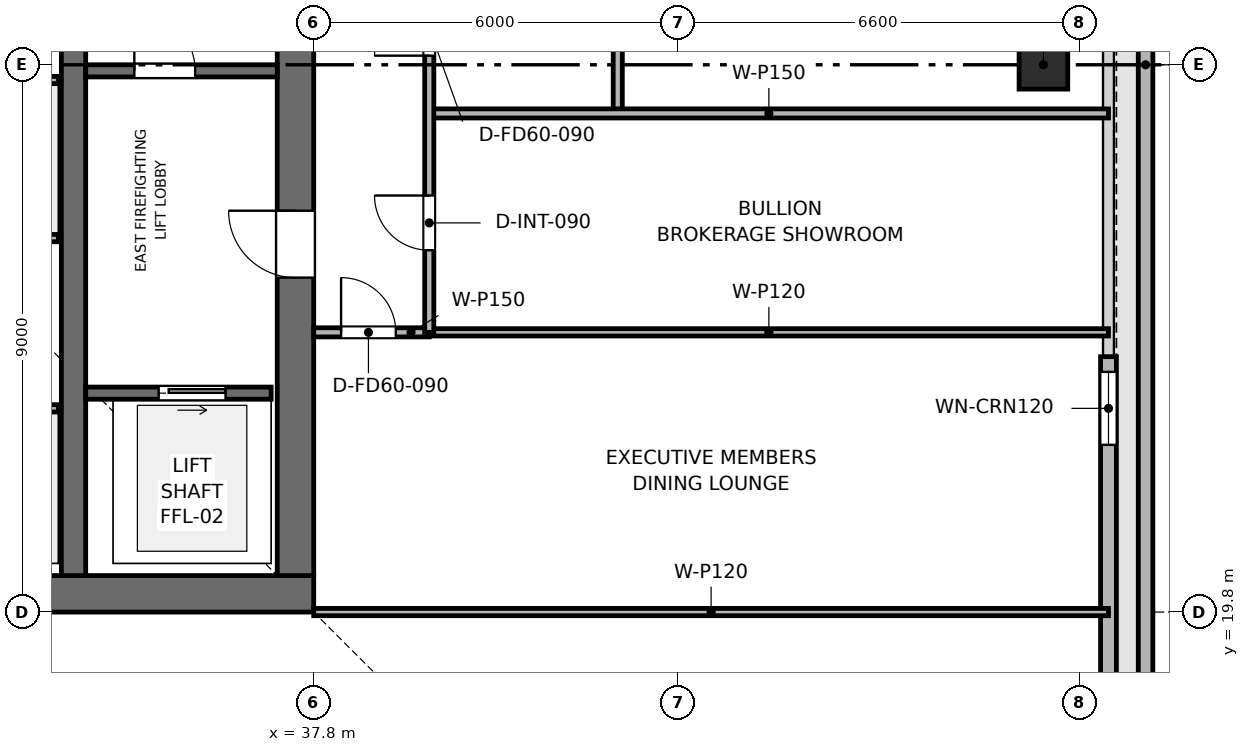
"""IFC4 building model, lengths in metres.
Left out: names, types, materials, properties, quantities, classifications, styles, units other than length and angle.
Written with IfcOpenShell. Run it as: python <this file> out.ifc"""

import sys

from ifc_helpers import new_model, si_unit, direction, frame, frame_2d, origin, origin_2d, place, context, subcontext, project, spatial, rectangle, extrude, element, fill, save


model = new_model("IFC4")
c1 = context("Model", 3, precision=1e-05, world=origin(), true_north=direction((0.0, 1.0)))
c2 = subcontext(c1, "Body", "Model", "MODEL_VIEW")
j1 = project(units=[si_unit("LENGTHUNIT", "METRE"), si_unit("PLANEANGLEUNIT", "RADIAN")], contexts=[c1])
p1 = place(None, origin())
s1 = spatial("IfcSite", under=j1, at=p1, CompositionType="ELEMENT")
p2 = place(p1, origin())
s2 = spatial("IfcBuilding", under=s1, at=p2, CompositionType="ELEMENT")
p3 = place(p2, frame((0.0, 0.0, 333.0)))
s3 = spatial("IfcBuildingStorey", under=s2, at=p3, CompositionType="ELEMENT", Elevation=333.0)
p4 = place(p3, frame((19.8, 20.1, 0.0), z_axis=(0.0, 0.0, 1.0), x_axis=(1.0, 0.0, 0.0)))
e1 = element("IfcWall", 1, at=p4, inside=s3, PredefinedType="SHEAR", context=c2, shape_type="SweptSolid", body=[
    extrude(rectangle(XDim=18.0, YDim=0.6, at=frame_2d((9.0, 0.0))), origin(), (0.0, 0.0, 1.0), 3.75),
])
p5 = place(p3, frame((37.5, 20.4, 0.0), z_axis=(0.0, 0.0, 1.0), x_axis=(0.0, 1.0, 0.0)))
e2 = element("IfcWall", 2, at=p5, inside=s3, PredefinedType="SHEAR", context=c2, shape_type="SweptSolid", body=[
    extrude(rectangle(XDim=16.8, YDim=0.6, at=frame_2d((8.4, 0.0))), origin(), (0.0, 0.0, 1.0), 3.75),
])
p6 = place(p5, frame((4.9, 0.0, 0.0)))
e3 = element("IfcOpeningElement", 3, at=p6, cuts=e2, PredefinedType="OPENING", context=c2, shape_type="SweptSolid", body=[
    extrude(rectangle(XDim=1.1, YDim=2.15, at=frame_2d((0.55, 1.075))), frame((0.0, 0.31, 0.0), z_axis=(0.0, -1.0, 0.0), x_axis=(1.0, 0.0, 0.0)), (0.0, 0.0, 1.0), 0.62),
])
p7 = place(p3, frame((33.85, 20.4, 0.0), z_axis=(0.0, 0.0, 1.0), x_axis=(0.0, 1.0, 0.0)))
e4 = element("IfcWall", 4, at=p7, inside=s3, PredefinedType="SHEAR", context=c2, shape_type="SweptSolid", body=[
    extrude(rectangle(XDim=16.8, YDim=0.4, at=frame_2d((8.4, 0.0))), origin(), (0.0, 0.0, 1.0), 3.75),
])
p8 = place(p3, frame((49.8, 28.8, 0.003), z_axis=(0.0, 0.0, 1.0), x_axis=(1.0, 0.0, 0.0)))
e5 = element("IfcColumn", 5, at=p8, inside=s3, PredefinedType="COLUMN", context=c2, shape_type="SweptSolid", body=[
    extrude(rectangle(XDim=0.8, YDim=0.8, at=origin_2d()), origin(), (0.0, 0.0, 1.0), 3.504),
])
p9 = place(p3, frame((51.48, 12.555, 0.0), z_axis=(0.0, 0.0, 1.0), x_axis=(0.0, 1.0, 0.0)))
e6 = element("IfcWall", 6, at=p9, inside=s3, PredefinedType="PARAPET", context=c2, shape_type="SweptSolid", body=[
    extrude(rectangle(XDim=32.49, YDim=0.24, at=frame_2d((16.245, 0.0))), origin(), (0.0, 0.0, 1.0), 1.2),
])
p10 = place(p3, frame((50.87, 24.0, 0.0), z_axis=(0.0, 0.0, 1.0), x_axis=(0.0, -1.0, 0.0)))
e7 = element("IfcWall", 7, at=p10, inside=s3, PredefinedType="SOLIDWALL", context=c2, shape_type="SweptSolid", body=[
    extrude(rectangle(XDim=11.4, YDim=0.26, at=frame_2d((5.7, 0.0))), origin(), (0.0, 0.0, 1.0), 3.51),
])
p11 = place(p10, frame((0.25, 0.0, 0.9)))
e8 = element("IfcOpeningElement", 8, at=p11, cuts=e7, PredefinedType="OPENING", context=c2, shape_type="SweptSolid", body=[
    extrude(rectangle(XDim=1.2, YDim=2.1, at=frame_2d((0.6, 1.05))), frame((0.0, 0.14, 0.0), z_axis=(0.0, -1.0, 0.0), x_axis=(1.0, 0.0, 0.0)), (0.0, 0.0, 1.0), 0.28),
])
p12 = place(p3, frame((34.05, 28.7, 0.0), z_axis=(0.0, 0.0, 1.0), x_axis=(1.0, 0.0, 0.0)))
e9 = element("IfcWall", 9, at=p12, inside=s3, PredefinedType="SHEAR", context=c2, shape_type="SweptSolid", body=[
    extrude(rectangle(XDim=3.15, YDim=0.2, at=frame_2d((1.575, 0.0))), origin(), (0.0, 0.0, 1.0), 3.51),
])
p13 = place(p12, frame((0.8, 0.0, 0.0)))
e10 = element("IfcOpeningElement", 10, at=p13, cuts=e9, PredefinedType="OPENING", context=c2, shape_type="SweptSolid", body=[
    extrude(rectangle(XDim=1.0, YDim=2.1, at=frame_2d((0.5, 1.05))), frame((0.0, 0.11, 0.0), z_axis=(0.0, -1.0, 0.0), x_axis=(1.0, 0.0, 0.0)), (0.0, 0.0, 1.0), 0.22),
])
p14 = place(p3, frame((34.05, 23.4, 0.0), z_axis=(0.0, 0.0, 1.0), x_axis=(1.0, 0.0, 0.0)))
e11 = element("IfcWall", 11, at=p14, inside=s3, PredefinedType="SHEAR", context=c2, shape_type="SweptSolid", body=[
    extrude(rectangle(XDim=3.05, YDim=0.2, at=frame_2d((1.525, 0.0))), origin(), (0.0, 0.0, 1.0), 3.51),
])
p15 = place(p14, frame((1.2, 0.0, 0.0)))
e12 = element("IfcOpeningElement", 12, at=p15, cuts=e11, PredefinedType="OPENING", context=c2, shape_type="SweptSolid", body=[
    extrude(rectangle(XDim=1.1, YDim=2.15, at=frame_2d((0.55, 1.075))), frame((0.0, 0.11, 0.0), z_axis=(0.0, -1.0, 0.0), x_axis=(1.0, 0.0, 0.0)), (0.0, 0.0, 1.0), 0.22),
])
p16 = place(p3, frame((29.55, 23.15, 0.0), z_axis=(0.0, 0.0, 1.0), x_axis=(1.0, 0.0, 0.0)))
e13 = element("IfcWall", 13, at=p16, inside=s3, PredefinedType="PARTITIONING", context=c2, shape_type="SweptSolid", body=[
    extrude(rectangle(XDim=4.05, YDim=0.12, at=frame_2d((2.025, 0.0))), origin(), (0.0, 0.0, 1.0), 3.51),
])
p17 = place(p16, frame((1.575, 0.0, 0.0)))
e14 = element("IfcOpeningElement", 14, at=p17, cuts=e13, PredefinedType="OPENING", context=c2, shape_type="SweptSolid", body=[
    extrude(rectangle(XDim=0.9, YDim=2.1, at=frame_2d((0.45, 1.05))), frame((0.0, 0.07, 0.0), z_axis=(0.0, -1.0, 0.0), x_axis=(1.0, 0.0, 0.0)), (0.0, 0.0, 1.0), 0.14),
])
p18 = place(p3, frame((29.55, 25.95, 0.0), z_axis=(0.0, 0.0, 1.0), x_axis=(1.0, 0.0, 0.0)))
e15 = element("IfcWall", 15, at=p18, inside=s3, PredefinedType="PARTITIONING", context=c2, shape_type="SweptSolid", body=[
    extrude(rectangle(XDim=4.05, YDim=0.12, at=frame_2d((2.025, 0.0))), origin(), (0.0, 0.0, 1.0), 3.51),
])
p19 = place(p18, frame((1.575, 0.0, 0.0)))
e16 = element("IfcOpeningElement", 16, at=p19, cuts=e15, PredefinedType="OPENING", context=c2, shape_type="SweptSolid", body=[
    extrude(rectangle(XDim=0.9, YDim=2.1, at=frame_2d((0.45, 1.05))), frame((0.0, 0.07, 0.0), z_axis=(0.0, -1.0, 0.0), x_axis=(1.0, 0.0, 0.0)), (0.0, 0.0, 1.0), 0.14),
])
p20 = place(p3, frame((29.55, 28.55, 0.0), z_axis=(0.0, 0.0, 1.0), x_axis=(1.0, 0.0, 0.0)))
e17 = element("IfcWall", 17, at=p20, inside=s3, PredefinedType="PARTITIONING", context=c2, shape_type="SweptSolid", body=[
    extrude(rectangle(XDim=4.05, YDim=0.12, at=frame_2d((2.025, 0.0))), origin(), (0.0, 0.0, 1.0), 3.51),
])
p21 = place(p3, frame((37.8, 19.8, 0.0), z_axis=(0.0, 0.0, 1.0), x_axis=(1.0, 0.0, 0.0)))
e18 = element("IfcWall", 18, at=p21, inside=s3, PredefinedType="PARTITIONING", context=c2, shape_type="SweptSolid", body=[
    extrude(rectangle(XDim=13.07, YDim=0.12, at=frame_2d((6.535, 0.0))), origin(), (0.0, 0.0, 1.0), 3.095),
])
p22 = place(p3, frame((37.8, 24.4, 0.0), z_axis=(0.0, 0.0, 1.0), x_axis=(1.0, 0.0, 0.0)))
e19 = element("IfcWall", 19, at=p22, inside=s3, PredefinedType="PARTITIONING", context=c2, shape_type="SweptSolid", body=[
    extrude(rectangle(XDim=1.9, YDim=0.15, at=frame_2d((0.95, 0.0))), origin(), (0.0, 0.0, 1.0), 3.51),
])
p23 = place(p22, frame((0.45, 0.0, 0.0)))
e20 = element("IfcOpeningElement", 20, at=p23, cuts=e19, PredefinedType="OPENING", context=c2, shape_type="SweptSolid", body=[
    extrude(rectangle(XDim=0.9, YDim=2.1, at=frame_2d((0.45, 1.05))), frame((0.0, 0.085, 0.0), z_axis=(0.0, -1.0, 0.0), x_axis=(1.0, 0.0, 0.0)), (0.0, 0.0, 1.0), 0.17),
])
p24 = place(p3, frame((39.7, 24.4, 0.0), z_axis=(0.0, 0.0, 1.0), x_axis=(1.0, 0.0, 0.0)))
e21 = element("IfcWall", 21, at=p24, inside=s3, PredefinedType="PARTITIONING", context=c2, shape_type="SweptSolid", body=[
    extrude(rectangle(XDim=11.17, YDim=0.12, at=frame_2d((5.585, 0.0))), origin(), (0.0, 0.0, 1.0), 3.135),
])
p25 = place(p3, frame((42.8, 28.0, 0.0), z_axis=(0.0, 0.0, 1.0), x_axis=(0.0, 1.0, 0.0)))
e22 = element("IfcWall", 22, at=p25, inside=s3, PredefinedType="PARTITIONING", context=c2, shape_type="SweptSolid", body=[
    extrude(rectangle(XDim=11.7, YDim=0.15, at=frame_2d((5.85, 0.0))), origin(), (0.0, 0.0, 1.0), 3.095),
])
p26 = place(p25, frame((9.6, 0.0, 0.0)))
e23 = element("IfcOpeningElement", 23, at=p26, cuts=e22, PredefinedType="OPENING", context=c2, shape_type="SweptSolid", body=[
    extrude(rectangle(XDim=0.9, YDim=2.1, at=frame_2d((0.45, 1.05))), frame((0.0, 0.085, 0.0), z_axis=(0.0, -1.0, 0.0), x_axis=(1.0, 0.0, 0.0)), (0.0, 0.0, 1.0), 0.17),
])
p27 = place(p3, frame((39.7, 28.0, 0.0), z_axis=(0.0, 0.0, 1.0), x_axis=(1.0, 0.0, 0.0)))
e24 = element("IfcWall", 24, at=p27, inside=s3, PredefinedType="PARTITIONING", context=c2, shape_type="SweptSolid", body=[
    extrude(rectangle(XDim=11.17, YDim=0.15, at=frame_2d((5.585, 0.0))), origin(), (0.0, 0.0, 1.0), 3.135),
])
p28 = place(p3, frame((39.7, 24.4, 0.0), z_axis=(0.0, 0.0, 1.0), x_axis=(0.0, 1.0, 0.0)))
e25 = element("IfcWall", 25, at=p28, inside=s3, PredefinedType="PARTITIONING", context=c2, shape_type="SweptSolid", body=[
    extrude(rectangle(XDim=15.3, YDim=0.15, at=frame_2d((7.65, 0.0))), origin(), (0.0, 0.0, 1.0), 3.095),
])
p29 = place(p28, frame((1.35, 0.0, 0.0)))
e26 = element("IfcOpeningElement", 26, at=p29, cuts=e25, PredefinedType="OPENING", context=c2, shape_type="SweptSolid", body=[
    extrude(rectangle(XDim=0.9, YDim=2.1, at=frame_2d((0.45, 1.05))), frame((0.0, 0.085, 0.0), z_axis=(0.0, -1.0, 0.0), x_axis=(1.0, 0.0, 0.0)), (0.0, 0.0, 1.0), 0.17),
])
p30 = place(p28, frame((4.55, 0.0, 0.0)))
e27 = element("IfcOpeningElement", 27, at=p30, cuts=e25, PredefinedType="OPENING", context=c2, shape_type="SweptSolid", body=[
    extrude(rectangle(XDim=0.9, YDim=2.1, at=frame_2d((0.45, 1.05))), frame((0.0, 0.085, 0.0), z_axis=(0.0, -1.0, 0.0), x_axis=(1.0, 0.0, 0.0)), (0.0, 0.0, 1.0), 0.17),
])
p31 = place(p28, frame((7.45, 0.0, 0.0)))
e28 = element("IfcOpeningElement", 28, at=p31, cuts=e25, PredefinedType="OPENING", context=c2, shape_type="SweptSolid", body=[
    extrude(rectangle(XDim=0.9, YDim=2.1, at=frame_2d((0.45, 1.05))), frame((0.0, 0.085, 0.0), z_axis=(0.0, -1.0, 0.0), x_axis=(1.0, 0.0, 0.0)), (0.0, 0.0, 1.0), 0.17),
])
p32 = place(p28, frame((10.2, 0.0, 0.0)))
e29 = element("IfcOpeningElement", 29, at=p32, cuts=e25, PredefinedType="OPENING", context=c2, shape_type="SweptSolid", body=[
    extrude(rectangle(XDim=0.95, YDim=2.1, at=frame_2d((0.475, 1.05))), frame((0.0, 0.085, 0.0), z_axis=(0.0, -1.0, 0.0), x_axis=(1.0, 0.0, 0.0)), (0.0, 0.0, 1.0), 0.17),
])
p33 = place(p28, frame((13.2, 0.0, 0.0)))
e30 = element("IfcOpeningElement", 30, at=p33, cuts=e25, PredefinedType="OPENING", context=c2, shape_type="SweptSolid", body=[
    extrude(rectangle(XDim=0.9, YDim=2.1, at=frame_2d((0.45, 1.05))), frame((0.0, 0.085, 0.0), z_axis=(0.0, -1.0, 0.0), x_axis=(1.0, 0.0, 0.0)), (0.0, 0.0, 1.0), 0.17),
])
p34 = place(p11, origin())
e31 = element("IfcWindow", 31, at=p34, inside=s3, PartitioningType="SINGLE_PANEL", PredefinedType="WINDOW", context=c2, shape_type="SweptSolid", body=[
    extrude(rectangle(XDim=1.2, YDim=2.1, at=frame_2d((0.6, 1.05))), frame((0.0, 0.03, 0.0), z_axis=(0.0, -1.0, 0.0), x_axis=(1.0, 0.0, 0.0)), (0.0, 0.0, 1.0), 0.06),
])
fill(e8, e31)
p35 = place(p13, origin())
e32 = element("IfcDoor", 32, at=p35, inside=s3, OperationType="SINGLE_SWING_LEFT", PredefinedType="DOOR", context=c2, shape_type="SweptSolid", body=[
    extrude(rectangle(XDim=1.0, YDim=2.1, at=frame_2d((0.5, 1.05))), frame((0.0, 0.025, 0.0), z_axis=(0.0, -1.0, 0.0), x_axis=(1.0, 0.0, 0.0)), (0.0, 0.0, 1.0), 0.05),
])
fill(e10, e32)
p36 = place(p15, origin())
e33 = element("IfcDoor", 33, at=p36, inside=s3, OperationType="SLIDING_TO_RIGHT", PredefinedType="DOOR", context=c2, shape_type="SweptSolid", body=[
    extrude(rectangle(XDim=1.1, YDim=2.15, at=frame_2d((0.55, 1.075))), frame((0.0, 0.025, 0.0), z_axis=(0.0, -1.0, 0.0), x_axis=(1.0, 0.0, 0.0)), (0.0, 0.0, 1.0), 0.05),
])
fill(e12, e33)
p37 = place(p23, origin())
e34 = element("IfcDoor", 34, at=p37, inside=s3, OperationType="SINGLE_SWING_LEFT", PredefinedType="DOOR", context=c2, shape_type="SweptSolid", body=[
    extrude(rectangle(XDim=0.9, YDim=2.1, at=frame_2d((0.45, 1.05))), frame((0.0, 0.025, 0.0), z_axis=(0.0, -1.0, 0.0), x_axis=(1.0, 0.0, 0.0)), (0.0, 0.0, 1.0), 0.05),
])
fill(e20, e34)
p38 = place(p29, origin())
e35 = element("IfcDoor", 35, at=p38, inside=s3, OperationType="SINGLE_SWING_RIGHT", PredefinedType="DOOR", context=c2, shape_type="SweptSolid", body=[
    extrude(rectangle(XDim=0.9, YDim=2.1, at=frame_2d((0.45, 1.05))), frame((0.0, 0.025, 0.0), z_axis=(0.0, -1.0, 0.0), x_axis=(1.0, 0.0, 0.0)), (0.0, 0.0, 1.0), 0.05),
])
fill(e26, e35)
p39 = place(p30, origin())
e36 = element("IfcDoor", 36, at=p39, inside=s3, OperationType="SINGLE_SWING_LEFT", PredefinedType="DOOR", context=c2, shape_type="SweptSolid", body=[
    extrude(rectangle(XDim=0.9, YDim=2.1, at=frame_2d((0.45, 1.05))), frame((0.0, 0.025, 0.0), z_axis=(0.0, -1.0, 0.0), x_axis=(1.0, 0.0, 0.0)), (0.0, 0.0, 1.0), 0.05),
])
fill(e27, e36)
p40 = place(p6, origin())
e37 = element("IfcDoor", 37, at=p40, inside=s3, OperationType="SINGLE_SWING_RIGHT", PredefinedType="DOOR", context=c2, shape_type="SweptSolid", body=[
    extrude(rectangle(XDim=1.1, YDim=2.15, at=frame_2d((0.55, 1.075))), frame((0.0, 0.025, 0.0), z_axis=(0.0, -1.0, 0.0), x_axis=(1.0, 0.0, 0.0)), (0.0, 0.0, 1.0), 0.05),
])
fill(e3, e37)
save(model, sys.argv[1])
